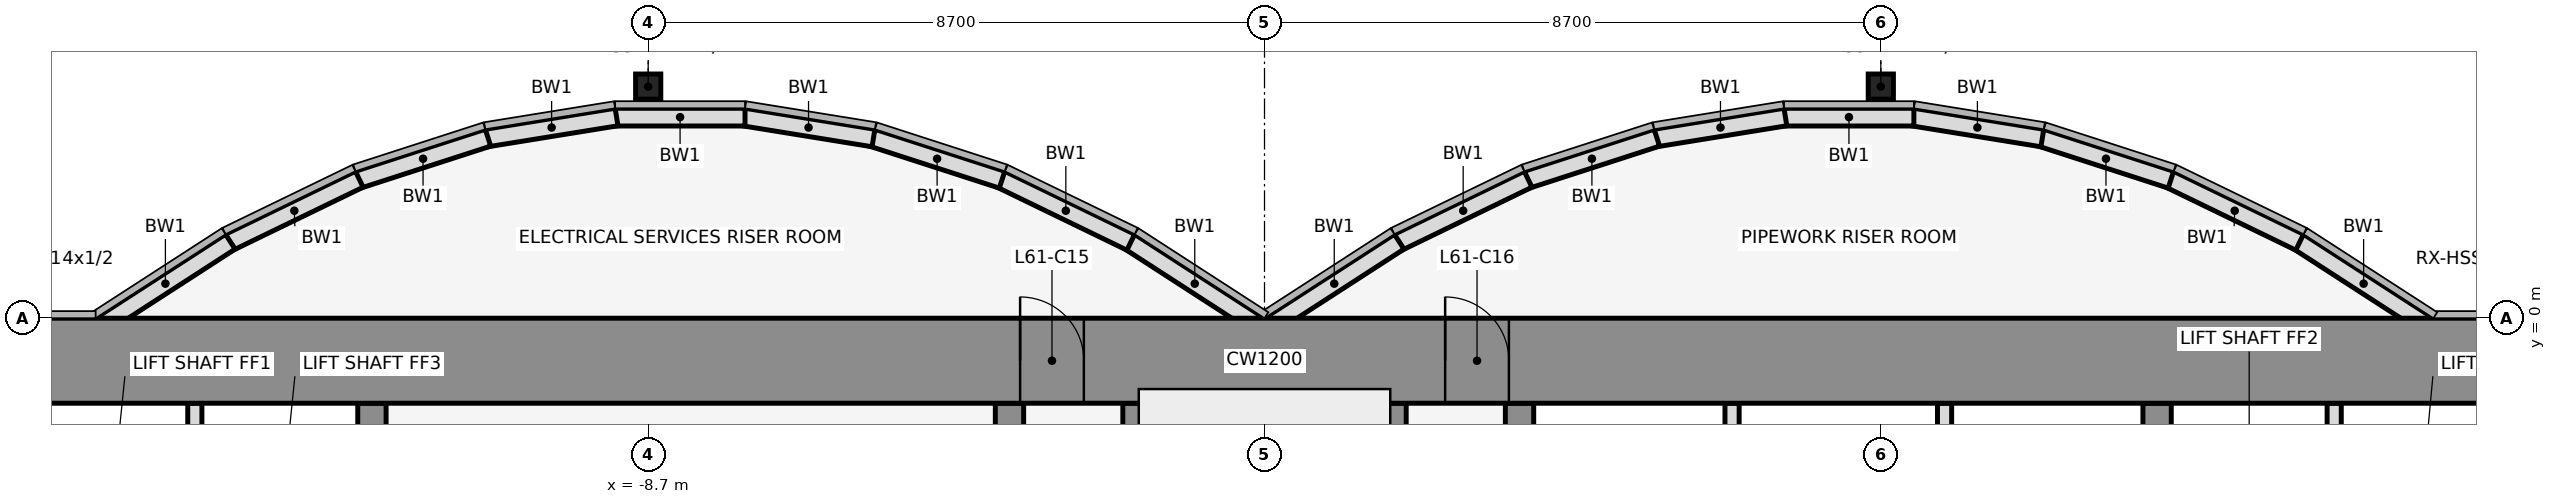
"""IFC4 building model, lengths in metres.
Left out: names, types, materials, properties, quantities, classifications, styles, units other than length and angle.
Written with IfcOpenShell. Run it as: python <this file> out.ifc"""

import sys

from ifc_helpers import new_model, si_unit, direction, frame, frame_2d, origin, origin_2d, place, context, subcontext, project, spatial, rectangle, hollow_rectangle, extrude, element, fill, save


model = new_model("IFC4")
c1 = context("Model", 3, precision=1e-05, world=origin(), true_north=direction((0.0, 1.0)))
c2 = subcontext(c1, "Body", "Model", "MODEL_VIEW")
j1 = project(units=[si_unit("LENGTHUNIT", "METRE"), si_unit("PLANEANGLEUNIT", "RADIAN")], contexts=[c1])
p1 = place(None, origin())
s1 = spatial("IfcSite", under=j1, at=p1, CompositionType="ELEMENT")
p2 = place(p1, origin())
s2 = spatial("IfcBuilding", under=s1, at=p2, CompositionType="ELEMENT")
p3 = place(p2, frame((0.0, 0.0, 270.8)))
s3 = spatial("IfcBuildingStorey", under=s2, at=p3, CompositionType="ELEMENT", Elevation=270.8)
for number, where, z_axis, x_axis in (
    (1, (-8.7, 3.269, 0.0), (0.0, 0.0, 1.0), (1.0, 0.0, 0.0)),
    (2, (8.7, 3.269, 0.0), (0.0, 0.0, 1.0), (1.0, 0.0, 0.0)),
):
    element("IfcColumn", number, at=place(p3, frame(where, z_axis=z_axis, x_axis=x_axis)), inside=s3, PredefinedType="COLUMN", context=c2, shape_type="SweptSolid", body=[
        extrude(hollow_rectangle(XDim=0.356, YDim=0.356, WallThickness=0.012, at=origin_2d()), origin(), (0.0, 0.0, 1.0), 4.2),
    ])
p4 = place(p3, frame((16.432, -0.105, 0.0), z_axis=(0.0, 0.0, 1.0), x_axis=(-0.83981312244, 0.542875602121, 0.0)))
e3 = element("IfcWall", 3, at=p4, inside=s3, PredefinedType="STANDARD", context=c2, shape_type="SweptSolid", body=[
    extrude(rectangle(XDim=2.183, YDim=0.25, at=frame_2d((1.091, 0.0))), origin(), (0.0, 0.0, 1.0), 4.05),
])
p5 = place(p3, frame((14.612, 1.073, 0.0), z_axis=(0.0, 0.0, 1.0), x_axis=(-0.89982408427, 0.436252928206, 0.0)))
e4 = element("IfcWall", 4, at=p5, inside=s3, PredefinedType="STANDARD", context=c2, shape_type="SweptSolid", body=[
    extrude(rectangle(XDim=2.038, YDim=0.25, at=frame_2d((1.019, 0.0))), origin(), (0.0, 0.0, 1.0), 4.05),
])
p6 = place(p3, frame((12.795, 1.955, 0.0), z_axis=(0.0, 0.0, 1.0), x_axis=(-0.951495806175, 0.307661714928, 0.0)))
e5 = element("IfcWall", 5, at=p6, inside=s3, PredefinedType="STANDARD", context=c2, shape_type="SweptSolid", body=[
    extrude(rectangle(XDim=1.927, YDim=0.25, at=frame_2d((0.963, 0.0))), origin(), (0.0, 0.0, 1.0), 4.05),
])
p7 = place(p3, frame((10.98, 2.543, 0.0), z_axis=(0.0, 0.0, 1.0), x_axis=(-0.987181718931, 0.159600293885, 0.0)))
e6 = element("IfcWall", 6, at=p7, inside=s3, PredefinedType="STANDARD", context=c2, shape_type="SweptSolid", body=[
    extrude(rectangle(XDim=1.857, YDim=0.25, at=frame_2d((0.929, 0.0))), origin(), (0.0, 0.0, 1.0), 4.05),
])
p8 = place(p3, frame((9.167, 2.838, 0.0), z_axis=(0.0, 0.0, 1.0), x_axis=(-1.0, 0.0, 0.0)))
e7 = element("IfcWall", 7, at=p8, inside=s3, PredefinedType="STANDARD", context=c2, shape_type="SweptSolid", body=[
    extrude(rectangle(XDim=1.833, YDim=0.25, at=frame_2d((0.917, 0.0))), origin(), (0.0, 0.0, 1.0), 4.05),
])
p9 = place(p3, frame((7.353, 2.84, 0.0), z_axis=(0.0, 0.0, 1.0), x_axis=(-0.987181718931, -0.159600293885, 0.0)))
e8 = element("IfcWall", 8, at=p9, inside=s3, PredefinedType="STANDARD", context=c2, shape_type="SweptSolid", body=[
    extrude(rectangle(XDim=1.857, YDim=0.25, at=frame_2d((0.929, 0.0))), origin(), (0.0, 0.0, 1.0), 4.05),
])
p10 = place(p3, frame((5.538, 2.548, 0.0), z_axis=(0.0, 0.0, 1.0), x_axis=(-0.951495806175, -0.307661714928, 0.0)))
e9 = element("IfcWall", 9, at=p10, inside=s3, PredefinedType="STANDARD", context=c2, shape_type="SweptSolid", body=[
    extrude(rectangle(XDim=1.927, YDim=0.25, at=frame_2d((0.963, 0.0))), origin(), (0.0, 0.0, 1.0), 4.05),
])
p11 = place(p3, frame((3.721, 1.962, 0.0), z_axis=(0.0, 0.0, 1.0), x_axis=(-0.89982408427, -0.436252928206, 0.0)))
e10 = element("IfcWall", 10, at=p11, inside=s3, PredefinedType="STANDARD", context=c2, shape_type="SweptSolid", body=[
    extrude(rectangle(XDim=2.038, YDim=0.25, at=frame_2d((1.019, 0.0))), origin(), (0.0, 0.0, 1.0), 4.05),
])
for number, where, z_axis, x_axis in (
    (11, (1.901, 1.08, 0.0), (0.0, 0.0, 1.0), (-0.84, -0.543, 0.0)),
    (12, (-0.068, -0.105, 0.0), (0.0, 0.0, 1.0), (-0.84, 0.543, 0.0)),
):
    element("IfcWall", number, at=place(p3, frame(where, z_axis=z_axis, x_axis=x_axis)), inside=s3, PredefinedType="STANDARD", context=c2, shape_type="SweptSolid", body=[
        extrude(rectangle(XDim=2.183, YDim=0.25, at=frame_2d((1.091, 0.0))), origin(), (0.0, 0.0, 1.0), 4.05),
    ])
p12 = place(p3, frame((-1.888, 1.073, 0.0), z_axis=(0.0, 0.0, 1.0), x_axis=(-0.89982408427, 0.436252928206, 0.0)))
e13 = element("IfcWall", 13, at=p12, inside=s3, PredefinedType="STANDARD", context=c2, shape_type="SweptSolid", body=[
    extrude(rectangle(XDim=2.038, YDim=0.25, at=frame_2d((1.019, 0.0))), origin(), (0.0, 0.0, 1.0), 4.05),
])
p13 = place(p3, frame((-3.705, 1.955, 0.0), z_axis=(0.0, 0.0, 1.0), x_axis=(-0.951495806175, 0.307661714928, 0.0)))
e14 = element("IfcWall", 14, at=p13, inside=s3, PredefinedType="STANDARD", context=c2, shape_type="SweptSolid", body=[
    extrude(rectangle(XDim=1.927, YDim=0.25, at=frame_2d((0.963, 0.0))), origin(), (0.0, 0.0, 1.0), 4.05),
])
p14 = place(p3, frame((-5.52, 2.543, 0.0), z_axis=(0.0, 0.0, 1.0), x_axis=(-0.987181718931, 0.159600293885, 0.0)))
e15 = element("IfcWall", 15, at=p14, inside=s3, PredefinedType="STANDARD", context=c2, shape_type="SweptSolid", body=[
    extrude(rectangle(XDim=1.857, YDim=0.25, at=frame_2d((0.929, 0.0))), origin(), (0.0, 0.0, 1.0), 4.05),
])
p15 = place(p3, frame((-7.333, 2.838, 0.0), z_axis=(0.0, 0.0, 1.0), x_axis=(-1.0, 0.0, 0.0)))
e16 = element("IfcWall", 16, at=p15, inside=s3, PredefinedType="STANDARD", context=c2, shape_type="SweptSolid", body=[
    extrude(rectangle(XDim=1.833, YDim=0.25, at=frame_2d((0.917, 0.0))), origin(), (0.0, 0.0, 1.0), 4.05),
])
p16 = place(p3, frame((-9.147, 2.84, 0.0), z_axis=(0.0, 0.0, 1.0), x_axis=(-0.987181718931, -0.159600293885, 0.0)))
e17 = element("IfcWall", 17, at=p16, inside=s3, PredefinedType="STANDARD", context=c2, shape_type="SweptSolid", body=[
    extrude(rectangle(XDim=1.857, YDim=0.25, at=frame_2d((0.929, 0.0))), origin(), (0.0, 0.0, 1.0), 4.05),
])
p17 = place(p3, frame((-10.962, 2.548, 0.0), z_axis=(0.0, 0.0, 1.0), x_axis=(-0.951495806175, -0.307661714928, 0.0)))
e18 = element("IfcWall", 18, at=p17, inside=s3, PredefinedType="STANDARD", context=c2, shape_type="SweptSolid", body=[
    extrude(rectangle(XDim=1.927, YDim=0.25, at=frame_2d((0.963, 0.0))), origin(), (0.0, 0.0, 1.0), 4.05),
])
p18 = place(p3, frame((-12.779, 1.962, 0.0), z_axis=(0.0, 0.0, 1.0), x_axis=(-0.89982408427, -0.436252928206, 0.0)))
e19 = element("IfcWall", 19, at=p18, inside=s3, PredefinedType="STANDARD", context=c2, shape_type="SweptSolid", body=[
    extrude(rectangle(XDim=2.038, YDim=0.25, at=frame_2d((1.019, 0.0))), origin(), (0.0, 0.0, 1.0), 4.05),
])
p19 = place(p3, frame((-14.599, 1.08, 0.0), z_axis=(0.0, 0.0, 1.0), x_axis=(-0.83981312244, -0.542875602121, 0.0)))
e20 = element("IfcWall", 20, at=p19, inside=s3, PredefinedType="STANDARD", context=c2, shape_type="SweptSolid", body=[
    extrude(rectangle(XDim=2.183, YDim=0.25, at=frame_2d((1.091, 0.0))), origin(), (0.0, 0.0, 1.0), 4.05),
])
p20 = place(p3, frame((-15.1, -4.6, 0.0), z_axis=(0.0, 0.0, 1.0), x_axis=(0.0, 1.0, 0.0)))
e21 = element("IfcWall", 21, at=p20, inside=s3, PredefinedType="PARTITIONING", context=c2, shape_type="SweptSolid", body=[
    extrude(rectangle(XDim=3.4, YDim=0.2, at=frame_2d((1.7, 0.0))), origin(), (0.0, 0.0, 1.0), 3.118),
])
p21 = place(p3, frame((-12.6, -11.8, 0.0), z_axis=(0.0, 0.0, 1.0), x_axis=(0.0, 1.0, 0.0)))
e22 = element("IfcWall", 22, at=p21, inside=s3, PredefinedType="SHEAR", context=c2, shape_type="SweptSolid", body=[
    extrude(rectangle(XDim=10.6, YDim=0.4, at=frame_2d((5.3, 0.0))), origin(), (0.0, 0.0, 1.0), 4.2),
])
p22 = place(p21, frame((4.75, 0.0, 0.0)))
e23 = element("IfcOpeningElement", 23, at=p22, cuts=e22, PredefinedType="OPENING", context=c2, shape_type="SweptSolid", body=[
    extrude(rectangle(XDim=1.1, YDim=2.1, at=frame_2d((0.55, 1.05))), frame((0.0, 0.212, 0.0), z_axis=(0.0, -1.0, 0.0), x_axis=(1.0, 0.0, 0.0)), (0.0, 0.0, 1.0), 0.424),
])
p23 = place(p3, frame((-3.6, -11.8, 0.0), z_axis=(0.0, 0.0, 1.0), x_axis=(0.0, 1.0, 0.0)))
e24 = element("IfcWall", 24, at=p23, inside=s3, PredefinedType="SHEAR", context=c2, shape_type="SweptSolid", body=[
    extrude(rectangle(XDim=10.6, YDim=0.4, at=frame_2d((5.3, 0.0))), origin(), (0.0, 0.0, 1.0), 4.2),
])
p24 = place(p23, frame((4.85, 0.0, 0.0)))
e25 = element("IfcOpeningElement", 25, at=p24, cuts=e24, PredefinedType="OPENING", context=c2, shape_type="SweptSolid", body=[
    extrude(rectangle(XDim=0.9, YDim=2.1, at=frame_2d((0.45, 1.05))), frame((0.0, 0.212, 0.0), z_axis=(0.0, -1.0, 0.0), x_axis=(1.0, 0.0, 0.0)), (0.0, 0.0, 1.0), 0.424),
])
for number, where, z_axis, x_axis in (
    (26, (-1.8, -11.8, 0.0), (0.0, 0.0, 1.0), (0.0, 1.0, 0.0)),
    (27, (1.8, -11.8, 0.0), (0.0, 0.0, 1.0), (0.0, 1.0, 0.0)),
):
    element("IfcWall", number, at=place(p3, frame(where, z_axis=z_axis, x_axis=x_axis)), inside=s3, PredefinedType="SHEAR", context=c2, shape_type="SweptSolid", body=[
        extrude(rectangle(XDim=10.6, YDim=0.4, at=frame_2d((5.3, 0.0))), origin(), (0.0, 0.0, 1.0), 4.2),
    ])
p25 = place(p3, frame((3.6, -11.8, 0.0), z_axis=(0.0, 0.0, 1.0), x_axis=(0.0, 1.0, 0.0)))
e28 = element("IfcWall", 28, at=p25, inside=s3, PredefinedType="SHEAR", context=c2, shape_type="SweptSolid", body=[
    extrude(rectangle(XDim=10.6, YDim=0.4, at=frame_2d((5.3, 0.0))), origin(), (0.0, 0.0, 1.0), 4.2),
])
p26 = place(p25, frame((1.35, 0.0, 0.0)))
e29 = element("IfcOpeningElement", 29, at=p26, cuts=e28, PredefinedType="OPENING", context=c2, shape_type="SweptSolid", body=[
    extrude(rectangle(XDim=0.9, YDim=2.1, at=frame_2d((0.45, 1.05))), frame((0.0, 0.212, 0.0), z_axis=(0.0, -1.0, 0.0), x_axis=(1.0, 0.0, 0.0)), (0.0, 0.0, 1.0), 0.424),
])
for number, where, z_axis, x_axis in (
    (30, (6.6, -4.6, 0.0), (0.0, 0.0, 1.0), (0.0, 1.0, 0.0)),
    (31, (9.6, -4.6, 0.0), (0.0, 0.0, 1.0), (0.0, 1.0, 0.0)),
):
    element("IfcWall", number, at=place(p3, frame(where, z_axis=z_axis, x_axis=x_axis)), inside=s3, PredefinedType="PARTITIONING", context=c2, shape_type="SweptSolid", body=[
        extrude(rectangle(XDim=3.4, YDim=0.2, at=frame_2d((1.7, 0.0))), origin(), (0.0, 0.0, 1.0), 3.118),
    ])
p27 = place(p3, frame((12.6, -11.8, 0.0), z_axis=(0.0, 0.0, 1.0), x_axis=(0.0, 1.0, 0.0)))
e32 = element("IfcWall", 32, at=p27, inside=s3, PredefinedType="SHEAR", context=c2, shape_type="SweptSolid", body=[
    extrude(rectangle(XDim=10.6, YDim=0.4, at=frame_2d((5.3, 0.0))), origin(), (0.0, 0.0, 1.0), 4.2),
])
p28 = place(p27, frame((4.75, 0.0, 0.0)))
e33 = element("IfcOpeningElement", 33, at=p28, cuts=e32, PredefinedType="OPENING", context=c2, shape_type="SweptSolid", body=[
    extrude(rectangle(XDim=1.1, YDim=2.1, at=frame_2d((0.55, 1.05))), frame((0.0, 0.212, 0.0), z_axis=(0.0, -1.0, 0.0), x_axis=(1.0, 0.0, 0.0)), (0.0, 0.0, 1.0), 0.424),
])
p29 = place(p3, frame((15.1, -4.6, 0.0), z_axis=(0.0, 0.0, 1.0), x_axis=(0.0, 1.0, 0.0)))
e34 = element("IfcWall", 34, at=p29, inside=s3, PredefinedType="PARTITIONING", context=c2, shape_type="SweptSolid", body=[
    extrude(rectangle(XDim=3.4, YDim=0.2, at=frame_2d((1.7, 0.0))), origin(), (0.0, 0.0, 1.0), 3.118),
])
p30 = place(p3, frame((-22.0, -0.6, 0.0), z_axis=(0.0, 0.0, 1.0), x_axis=(1.0, 0.0, 0.0)))
e35 = element("IfcWall", 35, at=p30, inside=s3, PredefinedType="SHEAR", context=c2, shape_type="SweptSolid", body=[
    extrude(rectangle(XDim=44.0, YDim=1.2, at=frame_2d((22.0, 0.0))), origin(), (0.0, 0.0, 1.0), 4.2),
])
p31 = place(p30, frame((18.55, 0.0, 0.0)))
e36 = element("IfcOpeningElement", 36, at=p31, cuts=e35, PredefinedType="OPENING", context=c2, shape_type="SweptSolid", body=[
    extrude(rectangle(XDim=0.9, YDim=2.1, at=frame_2d((0.45, 1.05))), frame((0.0, 0.612, 0.0), z_axis=(0.0, -1.0, 0.0), x_axis=(1.0, 0.0, 0.0)), (0.0, 0.0, 1.0), 1.224),
])
p32 = place(p30, frame((24.55, 0.0, 0.0)))
e37 = element("IfcOpeningElement", 37, at=p32, cuts=e35, PredefinedType="OPENING", context=c2, shape_type="SweptSolid", body=[
    extrude(rectangle(XDim=0.9, YDim=2.1, at=frame_2d((0.45, 1.05))), frame((0.0, 0.612, 0.0), z_axis=(0.0, -1.0, 0.0), x_axis=(1.0, 0.0, 0.0)), (0.0, 0.0, 1.0), 1.224),
])
p33 = place(p31, origin())
e38 = element("IfcDoor", 38, at=p33, inside=s3, OperationType="SINGLE_SWING_LEFT", PredefinedType="DOOR", context=c2, shape_type="SweptSolid", body=[
    extrude(rectangle(XDim=0.9, YDim=2.1, at=frame_2d((0.45, 1.05))), frame((0.0, 0.025, 0.0), z_axis=(0.0, -1.0, 0.0), x_axis=(1.0, 0.0, 0.0)), (0.0, 0.0, 1.0), 0.05),
])
fill(e36, e38)
p34 = place(p32, origin())
e39 = element("IfcDoor", 39, at=p34, inside=s3, OperationType="SINGLE_SWING_LEFT", PredefinedType="DOOR", context=c2, shape_type="SweptSolid", body=[
    extrude(rectangle(XDim=0.9, YDim=2.1, at=frame_2d((0.45, 1.05))), frame((0.0, 0.025, 0.0), z_axis=(0.0, -1.0, 0.0), x_axis=(1.0, 0.0, 0.0)), (0.0, 0.0, 1.0), 0.05),
])
fill(e37, e39)
save(model, sys.argv[1])
